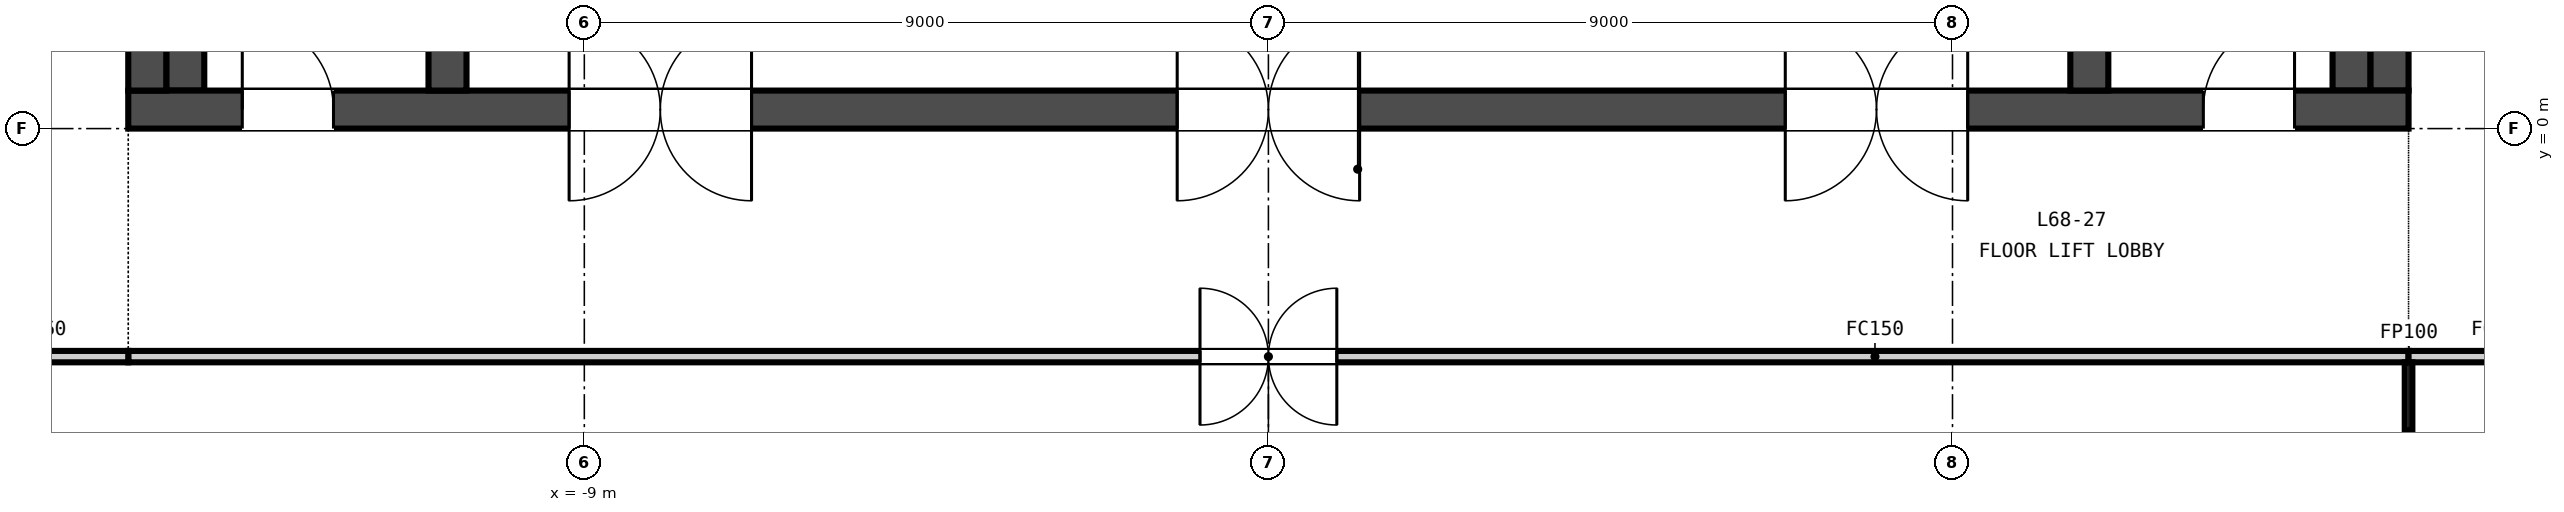
"""IFC4 building model, lengths in metres.
Left out: names, types, materials, properties, quantities, classifications, styles, units other than length and angle.
Written with IfcOpenShell. Run it as: python <this file> out.ifc"""

import sys

from ifc_helpers import new_model, si_unit, direction, frame, frame_2d, origin, place, context, subcontext, project, spatial, rectangle, extrude, element, fill, save


model = new_model("IFC4")
c1 = context("Model", 3, precision=1e-05, world=origin(), true_north=direction((0.0, 1.0)))
c2 = subcontext(c1, "Body", "Model", "MODEL_VIEW")
j1 = project(units=[si_unit("LENGTHUNIT", "METRE"), si_unit("PLANEANGLEUNIT", "RADIAN")], contexts=[c1])
p1 = place(None, origin())
s1 = spatial("IfcSite", under=j1, at=p1, CompositionType="ELEMENT")
p2 = place(p1, origin())
s2 = spatial("IfcBuilding", under=s1, at=p2, CompositionType="ELEMENT")
p3 = place(p2, frame((0.0, 0.0, 268.25)))
s3 = spatial("IfcBuildingStorey", under=s2, at=p3, CompositionType="ELEMENT", Elevation=268.25)
p4 = place(p3, frame((-15.0, 0.25, -0.15), z_axis=(0.0, 0.0, 1.0), x_axis=(1.0, 0.0, 0.0)))
e1 = element("IfcWall", 1, at=p4, inside=s3, PredefinedType="SOLIDWALL", context=c2, shape_type="SweptSolid", body=[
    extrude(rectangle(XDim=30.0, YDim=0.5, at=frame_2d((15.0, 0.0))), origin(), (0.0, 0.0, 1.0), 3.65),
])
p5 = place(p4, frame((5.8, 0.0, 0.15)))
e2 = element("IfcOpeningElement", 2, at=p5, cuts=e1, PredefinedType="OPENING", context=c2, shape_type="SweptSolid", body=[
    extrude(rectangle(XDim=2.4, YDim=2.4, at=frame_2d((1.2, 1.2))), frame((0.0, 0.26, 0.0), z_axis=(0.0, -1.0, 0.0), x_axis=(1.0, 0.0, 0.0)), (0.0, 0.0, 1.0), 0.52),
])
p6 = place(p4, frame((13.8, 0.0, 0.15)))
e3 = element("IfcOpeningElement", 3, at=p6, cuts=e1, PredefinedType="OPENING", context=c2, shape_type="SweptSolid", body=[
    extrude(rectangle(XDim=2.4, YDim=2.4, at=frame_2d((1.2, 1.2))), frame((0.0, 0.26, 0.0), z_axis=(0.0, -1.0, 0.0), x_axis=(1.0, 0.0, 0.0)), (0.0, 0.0, 1.0), 0.52),
])
p7 = place(p4, frame((21.8, 0.0, 0.15)))
e4 = element("IfcOpeningElement", 4, at=p7, cuts=e1, PredefinedType="OPENING", context=c2, shape_type="SweptSolid", body=[
    extrude(rectangle(XDim=2.4, YDim=2.4, at=frame_2d((1.2, 1.2))), frame((0.0, 0.26, 0.0), z_axis=(0.0, -1.0, 0.0), x_axis=(1.0, 0.0, 0.0)), (0.0, 0.0, 1.0), 0.52),
])
p8 = place(p4, frame((1.5, 0.0, 0.15)))
e5 = element("IfcOpeningElement", 5, at=p8, cuts=e1, PredefinedType="OPENING", context=c2, shape_type="SweptSolid", body=[
    extrude(rectangle(XDim=1.2, YDim=2.1, at=frame_2d((0.6, 1.05))), frame((0.0, 0.26, 0.0), z_axis=(0.0, -1.0, 0.0), x_axis=(1.0, 0.0, 0.0)), (0.0, 0.0, 1.0), 0.52),
])
p9 = place(p4, frame((27.3, 0.0, 0.15)))
e6 = element("IfcOpeningElement", 6, at=p9, cuts=e1, PredefinedType="OPENING", context=c2, shape_type="SweptSolid", body=[
    extrude(rectangle(XDim=1.2, YDim=2.1, at=frame_2d((0.6, 1.05))), frame((0.0, 0.26, 0.0), z_axis=(0.0, -1.0, 0.0), x_axis=(1.0, 0.0, 0.0)), (0.0, 0.0, 1.0), 0.52),
])
for number, where, z_axis, x_axis in (
    (7, (-14.75, 0.5, -0.15), (0.0, 0.0, 1.0), (0.0, 1.0, 0.0)),
    (8, (14.75, 0.5, -0.15), (0.0, 0.0, 1.0), (0.0, 1.0, 0.0)),
    (9, (-10.8, 0.5, -0.15), (0.0, 0.0, 1.0), (0.0, 1.0, 0.0)),
    (10, (10.8, 0.5, -0.15), (0.0, 0.0, 1.0), (0.0, 1.0, 0.0)),
):
    element("IfcWall", number, at=place(p3, frame(where, z_axis=z_axis, x_axis=x_axis)), inside=s3, PredefinedType="SOLIDWALL", context=c2, shape_type="SweptSolid", body=[
        extrude(rectangle(XDim=14.0, YDim=0.5, at=frame_2d((7.0, 0.0))), origin(), (0.0, 0.0, 1.0), 3.65),
    ])
for number, where, z_axis, x_axis in (
    (11, (-14.25, 0.5, 0.0), (0.0, 0.0, 1.0), (0.0, 1.0, 0.0)),
    (12, (14.25, 0.5, 0.0), (0.0, 0.0, 1.0), (0.0, 1.0, 0.0)),
):
    element("IfcWall", number, at=place(p3, frame(where, z_axis=z_axis, x_axis=x_axis)), inside=s3, PredefinedType="SOLIDWALL", context=c2, shape_type="SweptSolid", body=[
        extrude(rectangle(XDim=14.0, YDim=0.5, at=frame_2d((7.0, 0.0))), origin(), (0.0, 0.0, 1.0), 3.5),
    ])
p10 = place(p3, frame((15.0, -3.0, 0.0), z_axis=(0.0, 0.0, 1.0), x_axis=(-1.0, 0.0, 0.0)))
e13 = element("IfcWall", 13, at=p10, inside=s3, PredefinedType="PARTITIONING", context=c2, shape_type="SweptSolid", body=[
    extrude(rectangle(XDim=30.0, YDim=0.15, at=frame_2d((15.0, 0.0))), origin(), (0.0, 0.0, 1.0), 2.751),
])
p11 = place(p10, frame((14.1, 0.0, 0.0)))
e14 = element("IfcOpeningElement", 14, at=p11, cuts=e13, PredefinedType="OPENING", context=c2, shape_type="SweptSolid", body=[
    extrude(rectangle(XDim=1.8, YDim=2.1, at=frame_2d((0.9, 1.05))), frame((0.0, 0.085, 0.0), z_axis=(0.0, -1.0, 0.0), x_axis=(1.0, 0.0, 0.0)), (0.0, 0.0, 1.0), 0.17),
])
for number, where, z_axis, x_axis in (
    (15, (-15.0, -3.0, 0.0), (0.0, 0.0, 1.0), (-1.0, 0.0, 0.0)),
    (16, (17.4, -3.0, 0.0), (0.0, 0.0, 1.0), (-1.0, 0.0, 0.0)),
):
    element("IfcWall", number, at=place(p3, frame(where, z_axis=z_axis, x_axis=x_axis)), inside=s3, PredefinedType="PARTITIONING", context=c2, shape_type="SweptSolid", body=[
        extrude(rectangle(XDim=2.4, YDim=0.15, at=frame_2d((1.2, 0.0))), origin(), (0.0, 0.0, 1.0), 2.751),
    ])
p12 = place(p3, frame((15.0, -4.895, 0.0), z_axis=(0.0, 0.0, 1.0), x_axis=(0.0, 1.0, 0.0)))
e17 = element("IfcWall", 17, at=p12, inside=s3, PredefinedType="PARTITIONING", context=c2, shape_type="SweptSolid", body=[
    extrude(rectangle(XDim=1.82, YDim=0.1, at=frame_2d((0.91, 0.0))), origin(), (0.0, 0.0, 1.0), 2.751),
])
p13 = place(p5, origin())
e18 = element("IfcDoor", 18, at=p13, inside=s3, OperationType="DOUBLE_DOOR_DOUBLE_SWING", PredefinedType="DOOR", context=c2, shape_type="SweptSolid", body=[
    extrude(rectangle(XDim=2.4, YDim=2.4, at=frame_2d((1.2, 1.2))), frame((0.0, 0.025, 0.0), z_axis=(0.0, -1.0, 0.0), x_axis=(1.0, 0.0, 0.0)), (0.0, 0.0, 1.0), 0.05),
])
fill(e2, e18)
p14 = place(p6, origin())
e19 = element("IfcDoor", 19, at=p14, inside=s3, OperationType="DOUBLE_DOOR_DOUBLE_SWING", PredefinedType="DOOR", context=c2, shape_type="SweptSolid", body=[
    extrude(rectangle(XDim=2.4, YDim=2.4, at=frame_2d((1.2, 1.2))), frame((0.0, 0.025, 0.0), z_axis=(0.0, -1.0, 0.0), x_axis=(1.0, 0.0, 0.0)), (0.0, 0.0, 1.0), 0.05),
])
fill(e3, e19)
p15 = place(p7, origin())
e20 = element("IfcDoor", 20, at=p15, inside=s3, OperationType="DOUBLE_DOOR_DOUBLE_SWING", PredefinedType="DOOR", context=c2, shape_type="SweptSolid", body=[
    extrude(rectangle(XDim=2.4, YDim=2.4, at=frame_2d((1.2, 1.2))), frame((0.0, 0.025, 0.0), z_axis=(0.0, -1.0, 0.0), x_axis=(1.0, 0.0, 0.0)), (0.0, 0.0, 1.0), 0.05),
])
fill(e4, e20)
p16 = place(p8, origin())
e21 = element("IfcDoor", 21, at=p16, inside=s3, OperationType="SINGLE_SWING_LEFT", PredefinedType="DOOR", context=c2, shape_type="SweptSolid", body=[
    extrude(rectangle(XDim=1.2, YDim=2.1, at=frame_2d((0.6, 1.05))), frame((0.0, 0.025, 0.0), z_axis=(0.0, -1.0, 0.0), x_axis=(1.0, 0.0, 0.0)), (0.0, 0.0, 1.0), 0.05),
])
fill(e5, e21)
p17 = place(p9, origin())
e22 = element("IfcDoor", 22, at=p17, inside=s3, OperationType="SINGLE_SWING_RIGHT", PredefinedType="DOOR", context=c2, shape_type="SweptSolid", body=[
    extrude(rectangle(XDim=1.2, YDim=2.1, at=frame_2d((0.6, 1.05))), frame((0.0, 0.025, 0.0), z_axis=(0.0, -1.0, 0.0), x_axis=(1.0, 0.0, 0.0)), (0.0, 0.0, 1.0), 0.05),
])
fill(e6, e22)
p18 = place(p11, origin())
e23 = element("IfcDoor", 23, at=p18, inside=s3, OperationType="DOUBLE_DOOR_DOUBLE_SWING", PredefinedType="DOOR", context=c2, shape_type="SweptSolid", body=[
    extrude(rectangle(XDim=1.8, YDim=2.1, at=frame_2d((0.9, 1.05))), frame((0.0, 0.025, 0.0), z_axis=(0.0, -1.0, 0.0), x_axis=(1.0, 0.0, 0.0)), (0.0, 0.0, 1.0), 0.05),
])
fill(e14, e23)
save(model, sys.argv[1])
